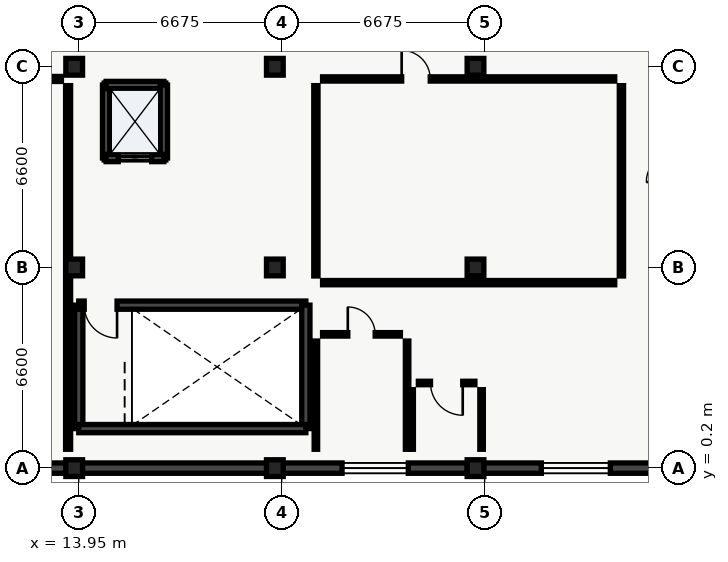
"""IFC4 building model, lengths in metres.
Left out: names, types, materials, properties, quantities, classifications, styles, units other than length and angle.
Written with IfcOpenShell. Run it as: python <this file> out.ifc"""

import sys

from ifc_helpers import new_model, si_unit, direction, frame, frame_2d, origin, origin_2d, place, context, subcontext, project, spatial, rectangle, extrude, element, fill, save


model = new_model("IFC4")
c1 = context("Model", 3, precision=1e-05, world=origin(), true_north=direction((0.0, 1.0)))
c2 = subcontext(c1, "Body", "Model", "MODEL_VIEW")
j1 = project(units=[si_unit("LENGTHUNIT", "METRE"), si_unit("PLANEANGLEUNIT", "RADIAN")], contexts=[c1])
p1 = place(None, origin())
s1 = spatial("IfcSite", under=j1, at=p1, CompositionType="ELEMENT")
p2 = place(p1, origin())
s2 = spatial("IfcBuilding", under=s1, at=p2, CompositionType="ELEMENT")
p3 = place(p2, frame((0.0, 0.0, 18.6)))
s3 = spatial("IfcBuildingStorey", under=s2, at=p3, CompositionType="ELEMENT", Elevation=18.6)
p4 = place(p3, frame((13.8, 0.2, 0.0), z_axis=(0.0, 0.0, 1.0), x_axis=(1.0, 0.0, 0.0)))
e1 = element("IfcColumn", 1, at=p4, inside=s3, PredefinedType="COLUMN", context=c2, shape_type="SweptSolid", body=[
    extrude(rectangle(XDim=0.55, YDim=0.55, at=origin_2d()), origin(), (0.0, 0.0, 1.0), 4.305),
])
p5 = place(p3, frame((13.8, 6.8, 0.0), z_axis=(0.0, 0.0, 1.0), x_axis=(1.0, 0.0, 0.0)))
e2 = element("IfcColumn", 2, at=p5, inside=s3, PredefinedType="COLUMN", context=c2, shape_type="SweptSolid", body=[
    extrude(rectangle(XDim=0.55, YDim=0.55, at=origin_2d()), origin(), (0.0, 0.0, 1.0), 5.905),
])
p6 = place(p3, frame((13.8, 13.4, 0.0), z_axis=(0.0, 0.0, 1.0), x_axis=(1.0, 0.0, 0.0)))
e3 = element("IfcColumn", 3, at=p6, inside=s3, PredefinedType="COLUMN", context=c2, shape_type="SweptSolid", body=[
    extrude(rectangle(XDim=0.55, YDim=0.55, at=origin_2d()), origin(), (0.0, 0.0, 1.0), 7.505),
])
p7 = place(p3, frame((20.4, 0.2, 0.0), z_axis=(0.0, 0.0, 1.0), x_axis=(1.0, 0.0, 0.0)))
e4 = element("IfcColumn", 4, at=p7, inside=s3, PredefinedType="COLUMN", context=c2, shape_type="SweptSolid", body=[
    extrude(rectangle(XDim=0.55, YDim=0.55, at=origin_2d()), origin(), (0.0, 0.0, 1.0), 4.305),
])
p8 = place(p3, frame((20.4, 6.8, 0.0), z_axis=(0.0, 0.0, 1.0), x_axis=(1.0, 0.0, 0.0)))
e5 = element("IfcColumn", 5, at=p8, inside=s3, PredefinedType="COLUMN", context=c2, shape_type="SweptSolid", body=[
    extrude(rectangle(XDim=0.55, YDim=0.55, at=origin_2d()), origin(), (0.0, 0.0, 1.0), 5.905),
])
p9 = place(p3, frame((20.4, 13.4, 0.0), z_axis=(0.0, 0.0, 1.0), x_axis=(1.0, 0.0, 0.0)))
e6 = element("IfcColumn", 6, at=p9, inside=s3, PredefinedType="COLUMN", context=c2, shape_type="SweptSolid", body=[
    extrude(rectangle(XDim=0.55, YDim=0.55, at=origin_2d()), origin(), (0.0, 0.0, 1.0), 7.505),
])
p10 = place(p3, frame((27.0, 0.2, 0.0), z_axis=(0.0, 0.0, 1.0), x_axis=(1.0, 0.0, 0.0)))
e7 = element("IfcColumn", 7, at=p10, inside=s3, PredefinedType="COLUMN", context=c2, shape_type="SweptSolid", body=[
    extrude(rectangle(XDim=0.55, YDim=0.55, at=origin_2d()), origin(), (0.0, 0.0, 1.0), 4.305),
])
p11 = place(p3, frame((27.0, 6.8, 0.0), z_axis=(0.0, 0.0, 1.0), x_axis=(1.0, 0.0, 0.0)))
e8 = element("IfcColumn", 8, at=p11, inside=s3, PredefinedType="COLUMN", context=c2, shape_type="SweptSolid", body=[
    extrude(rectangle(XDim=0.55, YDim=0.55, at=origin_2d()), origin(), (0.0, 0.0, 1.0), 5.905),
])
p12 = place(p3, frame((27.0, 13.4, 0.0), z_axis=(0.0, 0.0, 1.0), x_axis=(1.0, 0.0, 0.0)))
e9 = element("IfcColumn", 9, at=p12, inside=s3, PredefinedType="COLUMN", context=c2, shape_type="SweptSolid", body=[
    extrude(rectangle(XDim=0.55, YDim=0.55, at=origin_2d()), origin(), (0.0, 0.0, 1.0), 7.505),
])
p13 = place(p3, frame((33.33, 0.2, 0.0), z_axis=(0.0, 0.0, 1.0), x_axis=(-1.0, 0.0, 0.0)))
e10 = element("IfcWall", 10, at=p13, inside=s3, PredefinedType="SOLIDWALL", context=c2, shape_type="SweptSolid", body=[
    extrude(rectangle(XDim=6.06, YDim=0.34, at=frame_2d((3.03, 0.0))), origin(), (0.0, 0.0, 1.0), 4.28),
])
p14 = place(p13, frame((1.895, 0.0, 0.95)))
e11 = element("IfcOpeningElement", 11, at=p14, cuts=e10, PredefinedType="OPENING", context=c2, shape_type="SweptSolid", body=[
    extrude(rectangle(XDim=2.27, YDim=1.48, at=frame_2d((1.135, 0.74))), frame((0.0, 0.17, 0.0), z_axis=(0.0, -1.0, 0.0), x_axis=(1.0, 0.0, 0.0)), (0.0, 0.0, 1.0), 0.34),
])
p15 = place(p3, frame((26.73, 0.2, 0.0), z_axis=(0.0, 0.0, 1.0), x_axis=(-1.0, 0.0, 0.0)))
e12 = element("IfcWall", 12, at=p15, inside=s3, PredefinedType="SOLIDWALL", context=c2, shape_type="SweptSolid", body=[
    extrude(rectangle(XDim=6.06, YDim=0.34, at=frame_2d((3.03, 0.0))), origin(), (0.0, 0.0, 1.0), 4.28),
])
p16 = place(p15, frame((1.94, 0.0, 0.95)))
e13 = element("IfcOpeningElement", 13, at=p16, cuts=e12, PredefinedType="OPENING", context=c2, shape_type="SweptSolid", body=[
    extrude(rectangle(XDim=2.18, YDim=1.46, at=frame_2d((1.09, 0.73))), frame((0.0, 0.17, 0.0), z_axis=(0.0, -1.0, 0.0), x_axis=(1.0, 0.0, 0.0)), (0.0, 0.0, 1.0), 0.34),
])
p17 = place(p3, frame((20.13, 0.2, 0.0), z_axis=(0.0, 0.0, 1.0), x_axis=(-1.0, 0.0, 0.0)))
e14 = element("IfcWall", 14, at=p17, inside=s3, PredefinedType="SOLIDWALL", context=c2, shape_type="SweptSolid", body=[
    extrude(rectangle(XDim=6.06, YDim=0.34, at=frame_2d((3.03, 0.0))), origin(), (0.0, 0.0, 1.0), 4.28),
])
p18 = place(p3, frame((13.53, 0.2, 0.0), z_axis=(0.0, 0.0, 1.0), x_axis=(-1.0, 0.0, 0.0)))
e15 = element("IfcWall", 15, at=p18, inside=s3, PredefinedType="SOLIDWALL", context=c2, shape_type="SweptSolid", body=[
    extrude(rectangle(XDim=6.06, YDim=0.34, at=frame_2d((3.03, 0.0))), origin(), (0.0, 0.0, 1.0), 4.28),
])
p19 = place(p18, frame((2.03, 0.0, 0.95)))
e16 = element("IfcOpeningElement", 16, at=p19, cuts=e15, PredefinedType="OPENING", context=c2, shape_type="SweptSolid", body=[
    extrude(rectangle(XDim=2.0, YDim=1.42, at=frame_2d((1.0, 0.71))), frame((0.0, 0.17, 0.0), z_axis=(0.0, -1.0, 0.0), x_axis=(1.0, 0.0, 0.0)), (0.0, 0.0, 1.0), 0.34),
])
p20 = place(p3, frame((13.95, 1.5, 0.0), z_axis=(0.0, 0.0, 1.0), x_axis=(0.0, 1.0, 0.0)))
e17 = element("IfcWall", 17, at=p20, inside=s3, PredefinedType="SHEAR", context=c2, shape_type="SweptSolid", body=[
    extrude(rectangle(XDim=4.06, YDim=0.27, at=frame_2d((2.03, 0.0))), origin(), (0.0, 0.0, 1.0), 4.25),
])
p21 = place(p3, frame((13.95, 5.56, 0.0), z_axis=(0.0, 0.0, 1.0), x_axis=(1.0, 0.0, 0.0)))
e18 = element("IfcWall", 18, at=p21, inside=s3, PredefinedType="SHEAR", context=c2, shape_type="SweptSolid", body=[
    extrude(rectangle(XDim=7.47, YDim=0.27, at=frame_2d((3.735, 0.0))), origin(), (0.0, 0.0, 1.0), 4.25),
])
p22 = place(p21, frame((0.18, 0.0, 0.0)))
e19 = element("IfcOpeningElement", 19, at=p22, cuts=e18, PredefinedType="OPENING", context=c2, shape_type="SweptSolid", body=[
    extrude(rectangle(XDim=1.08, YDim=2.15, at=frame_2d((0.54, 1.075))), frame((0.0, 0.135, 0.0), z_axis=(0.0, -1.0, 0.0), x_axis=(1.0, 0.0, 0.0)), (0.0, 0.0, 1.0), 0.27),
])
p23 = place(p3, frame((21.42, 5.56, 0.0), z_axis=(0.0, 0.0, 1.0), x_axis=(0.0, -1.0, 0.0)))
e20 = element("IfcWall", 20, at=p23, inside=s3, PredefinedType="SHEAR", context=c2, shape_type="SweptSolid", body=[
    extrude(rectangle(XDim=4.06, YDim=0.27, at=frame_2d((2.03, 0.0))), origin(), (0.0, 0.0, 1.0), 4.25),
])
p24 = place(p3, frame((21.42, 1.5, 0.0), z_axis=(0.0, 0.0, 1.0), x_axis=(-1.0, 0.0, 0.0)))
e21 = element("IfcWall", 21, at=p24, inside=s3, PredefinedType="SHEAR", context=c2, shape_type="SweptSolid", body=[
    extrude(rectangle(XDim=7.47, YDim=0.27, at=frame_2d((3.735, 0.0))), origin(), (0.0, 0.0, 1.0), 4.25),
])
p25 = place(p3, frame((14.85, 10.4, 0.0), z_axis=(0.0, 0.0, 1.0), x_axis=(0.0, 1.0, 0.0)))
e22 = element("IfcWall", 22, at=p25, inside=s3, PredefinedType="SHEAR", context=c2, shape_type="SweptSolid", body=[
    extrude(rectangle(XDim=2.4, YDim=0.24, at=frame_2d((1.2, 0.0))), origin(), (0.0, 0.0, 1.0), 4.35),
])
p26 = place(p3, frame((14.85, 12.8, 0.0), z_axis=(0.0, 0.0, 1.0), x_axis=(1.0, 0.0, 0.0)))
e23 = element("IfcWall", 23, at=p26, inside=s3, PredefinedType="SHEAR", context=c2, shape_type="SweptSolid", body=[
    extrude(rectangle(XDim=1.9, YDim=0.24, at=frame_2d((0.95, 0.0))), origin(), (0.0, 0.0, 1.0), 4.35),
])
p27 = place(p3, frame((16.75, 12.8, 0.0), z_axis=(0.0, 0.0, 1.0), x_axis=(0.0, -1.0, 0.0)))
e24 = element("IfcWall", 24, at=p27, inside=s3, PredefinedType="SHEAR", context=c2, shape_type="SweptSolid", body=[
    extrude(rectangle(XDim=2.4, YDim=0.24, at=frame_2d((1.2, 0.0))), origin(), (0.0, 0.0, 1.0), 4.35),
])
p28 = place(p3, frame((16.75, 10.4, 0.0), z_axis=(0.0, 0.0, 1.0), x_axis=(-1.0, 0.0, 0.0)))
e25 = element("IfcWall", 25, at=p28, inside=s3, PredefinedType="SHEAR", context=c2, shape_type="SweptSolid", body=[
    extrude(rectangle(XDim=1.9, YDim=0.24, at=frame_2d((0.95, 0.0))), origin(), (0.0, 0.0, 1.0), 4.35),
])
p29 = place(p28, frame((0.4, 0.0, 0.0)))
e26 = element("IfcOpeningElement", 26, at=p29, cuts=e25, PredefinedType="OPENING", context=c2, shape_type="SweptSolid", body=[
    extrude(rectangle(XDim=1.1, YDim=2.2, at=frame_2d((0.55, 1.1))), frame((0.0, 0.12, 0.0), z_axis=(0.0, -1.0, 0.0), x_axis=(1.0, 0.0, 0.0)), (0.0, 0.0, 1.0), 0.24),
])
p30 = place(p3, frame((24.75, 0.82, 0.0), z_axis=(0.0, 0.0, 1.0), x_axis=(0.0, 1.0, 0.0)))
e27 = element("IfcWall", 27, at=p30, inside=s3, PredefinedType="PARTITIONING", context=c2, shape_type="SweptSolid", body=[
    extrude(rectangle(XDim=3.56, YDim=0.115, at=frame_2d((1.78, 0.0))), origin(), (0.0, 0.0, 1.0), 3.95),
])
p31 = place(p3, frame((24.53, 4.6, 0.0), z_axis=(0.0, 0.0, 1.0), x_axis=(-1.0, 0.0, 0.0)))
e28 = element("IfcWall", 28, at=p31, inside=s3, PredefinedType="PARTITIONING", context=c2, shape_type="SweptSolid", body=[
    extrude(rectangle(XDim=2.56, YDim=0.115, at=frame_2d((1.28, 0.0))), origin(), (0.0, 0.0, 1.0), 3.95),
])
p32 = place(p31, frame((0.83, 0.0, 0.0)))
e29 = element("IfcOpeningElement", 29, at=p32, cuts=e28, PredefinedType="OPENING", context=c2, shape_type="SweptSolid", body=[
    extrude(rectangle(XDim=0.9, YDim=2.1, at=frame_2d((0.45, 1.05))), frame((0.0, 0.058, 0.0), z_axis=(0.0, -1.0, 0.0), x_axis=(1.0, 0.0, 0.0)), (0.0, 0.0, 1.0), 0.115),
])
p33 = place(p3, frame((21.75, 4.38, 0.0), z_axis=(0.0, 0.0, 1.0), x_axis=(0.0, -1.0, 0.0)))
e30 = element("IfcWall", 30, at=p33, inside=s3, PredefinedType="PARTITIONING", context=c2, shape_type="SweptSolid", body=[
    extrude(rectangle(XDim=3.56, YDim=0.115, at=frame_2d((1.78, 0.0))), origin(), (0.0, 0.0, 1.0), 3.95),
])
p34 = place(p3, frame((27.2, 0.82, 0.0), z_axis=(0.0, 0.0, 1.0), x_axis=(0.0, 1.0, 0.0)))
e31 = element("IfcWall", 31, at=p34, inside=s3, PredefinedType="PARTITIONING", context=c2, shape_type="SweptSolid", body=[
    extrude(rectangle(XDim=1.96, YDim=0.115, at=frame_2d((0.98, 0.0))), origin(), (0.0, 0.0, 1.0), 3.69),
])
p35 = place(p3, frame((26.98, 3.0, 0.0), z_axis=(0.0, 0.0, 1.0), x_axis=(-1.0, 0.0, 0.0)))
e32 = element("IfcWall", 32, at=p35, inside=s3, PredefinedType="PARTITIONING", context=c2, shape_type="SweptSolid", body=[
    extrude(rectangle(XDim=1.86, YDim=0.115, at=frame_2d((0.93, 0.0))), origin(), (0.0, 0.0, 1.0), 3.95),
])
p36 = place(p35, frame((0.4, 0.0, 0.0)))
e33 = element("IfcOpeningElement", 33, at=p36, cuts=e32, PredefinedType="OPENING", context=c2, shape_type="SweptSolid", body=[
    extrude(rectangle(XDim=1.06, YDim=2.12, at=frame_2d((0.53, 1.06))), frame((0.0, 0.058, 0.0), z_axis=(0.0, -1.0, 0.0), x_axis=(1.0, 0.0, 0.0)), (0.0, 0.0, 1.0), 0.115),
])
p37 = place(p3, frame((24.9, 2.78, 0.0), z_axis=(0.0, 0.0, 1.0), x_axis=(0.0, -1.0, 0.0)))
e34 = element("IfcWall", 34, at=p37, inside=s3, PredefinedType="PARTITIONING", context=c2, shape_type="SweptSolid", body=[
    extrude(rectangle(XDim=1.96, YDim=0.115, at=frame_2d((0.98, 0.0))), origin(), (0.0, 0.0, 1.0), 3.95),
])
p38 = place(p3, frame((21.97, 6.3, 0.0), z_axis=(0.0, 0.0, 1.0), x_axis=(1.0, 0.0, 0.0)))
e35 = element("IfcWall", 35, at=p38, inside=s3, PredefinedType="PARTITIONING", context=c2, shape_type="SweptSolid", body=[
    extrude(rectangle(XDim=9.61, YDim=0.14, at=frame_2d((4.805, 0.0))), origin(), (0.0, 0.0, 1.0), 3.95),
])
p39 = place(p3, frame((31.8, 6.52, 0.0), z_axis=(0.0, 0.0, 1.0), x_axis=(0.0, 1.0, 0.0)))
e36 = element("IfcWall", 36, at=p39, inside=s3, PredefinedType="PARTITIONING", context=c2, shape_type="SweptSolid", body=[
    extrude(rectangle(XDim=6.26, YDim=0.14, at=frame_2d((3.13, 0.0))), origin(), (0.0, 0.0, 1.0), 3.95),
])
p40 = place(p3, frame((31.58, 13.0, 0.0), z_axis=(0.0, 0.0, 1.0), x_axis=(-1.0, 0.0, 0.0)))
e37 = element("IfcWall", 37, at=p40, inside=s3, PredefinedType="PARTITIONING", context=c2, shape_type="SweptSolid", body=[
    extrude(rectangle(XDim=9.61, YDim=0.14, at=frame_2d((4.805, 0.0))), origin(), (0.0, 0.0, 1.0), 3.95),
])
p41 = place(p40, frame((6.069, 0.0, 0.0)))
e38 = element("IfcOpeningElement", 38, at=p41, cuts=e37, PredefinedType="OPENING", context=c2, shape_type="SweptSolid", body=[
    extrude(rectangle(XDim=0.94, YDim=2.12, at=frame_2d((0.47, 1.06))), frame((0.0, 0.07, 0.0), z_axis=(0.0, -1.0, 0.0), x_axis=(1.0, 0.0, 0.0)), (0.0, 0.0, 1.0), 0.14),
])
p42 = place(p3, frame((21.75, 12.78, 0.0), z_axis=(0.0, 0.0, 1.0), x_axis=(0.0, -1.0, 0.0)))
e39 = element("IfcWall", 39, at=p42, inside=s3, PredefinedType="PARTITIONING", context=c2, shape_type="SweptSolid", body=[
    extrude(rectangle(XDim=6.26, YDim=0.14, at=frame_2d((3.13, 0.0))), origin(), (0.0, 0.0, 1.0), 3.95),
])
p43 = place(p3, frame((13.6, 0.82, 0.0), z_axis=(0.0, 0.0, 1.0), x_axis=(0.0, 1.0, 0.0)))
e40 = element("IfcWall", 40, at=p43, inside=s3, PredefinedType="PARTITIONING", context=c2, shape_type="SweptSolid", body=[
    extrude(rectangle(XDim=11.96, YDim=0.165, at=frame_2d((5.98, 0.0))), origin(), (0.0, 0.0, 1.0), 3.69),
])
p44 = place(p3, frame((13.38, 13.0, 0.0), z_axis=(0.0, 0.0, 1.0), x_axis=(-1.0, 0.0, 0.0)))
e41 = element("IfcWall", 41, at=p44, inside=s3, PredefinedType="PARTITIONING", context=c2, shape_type="SweptSolid", body=[
    extrude(rectangle(XDim=12.16, YDim=0.165, at=frame_2d((6.08, 0.0))), origin(), (0.0, 0.0, 1.0), 3.95),
])
p45 = place(p44, frame((7.665, 0.0, 0.0)))
e42 = element("IfcOpeningElement", 42, at=p45, cuts=e41, PredefinedType="OPENING", context=c2, shape_type="SweptSolid", body=[
    extrude(rectangle(XDim=1.21, YDim=2.16, at=frame_2d((0.605, 1.08))), frame((0.0, 0.083, 0.0), z_axis=(0.0, -1.0, 0.0), x_axis=(1.0, 0.0, 0.0)), (0.0, 0.0, 1.0), 0.165),
])
p46 = place(p14, origin())
e43 = element("IfcWindow", 43, at=p46, inside=s3, PartitioningType="SINGLE_PANEL", PredefinedType="WINDOW", context=c2, shape_type="SweptSolid", body=[
    extrude(rectangle(XDim=2.27, YDim=1.48, at=frame_2d((1.135, 0.74))), frame((0.0, 0.03, 0.0), z_axis=(0.0, -1.0, 0.0), x_axis=(1.0, 0.0, 0.0)), (0.0, 0.0, 1.0), 0.06),
])
fill(e11, e43)
p47 = place(p16, origin())
e44 = element("IfcWindow", 44, at=p47, inside=s3, PartitioningType="SINGLE_PANEL", PredefinedType="WINDOW", context=c2, shape_type="SweptSolid", body=[
    extrude(rectangle(XDim=2.18, YDim=1.46, at=frame_2d((1.09, 0.73))), frame((0.0, 0.03, 0.0), z_axis=(0.0, -1.0, 0.0), x_axis=(1.0, 0.0, 0.0)), (0.0, 0.0, 1.0), 0.06),
])
fill(e13, e44)
p48 = place(p22, origin())
e45 = element("IfcDoor", 45, at=p48, inside=s3, OperationType="SINGLE_SWING_RIGHT", PredefinedType="DOOR", context=c2, shape_type="SweptSolid", body=[
    extrude(rectangle(XDim=1.08, YDim=2.15, at=frame_2d((0.54, 1.075))), frame((0.0, 0.025, 0.0), z_axis=(0.0, -1.0, 0.0), x_axis=(1.0, 0.0, 0.0)), (0.0, 0.0, 1.0), 0.05),
])
fill(e19, e45)
p49 = place(p29, origin())
e46 = element("IfcDoor", 46, at=p49, inside=s3, OperationType="SLIDING_TO_LEFT", PredefinedType="DOOR", context=c2, shape_type="SweptSolid", body=[
    extrude(rectangle(XDim=1.1, YDim=2.2, at=frame_2d((0.55, 1.1))), frame((0.0, 0.025, 0.0), z_axis=(0.0, -1.0, 0.0), x_axis=(1.0, 0.0, 0.0)), (0.0, 0.0, 1.0), 0.05),
])
fill(e26, e46)
p50 = place(p32, origin())
e47 = element("IfcDoor", 47, at=p50, inside=s3, OperationType="SINGLE_SWING_RIGHT", PredefinedType="DOOR", context=c2, shape_type="SweptSolid", body=[
    extrude(rectangle(XDim=0.9, YDim=2.1, at=frame_2d((0.45, 1.05))), frame((0.0, 0.025, 0.0), z_axis=(0.0, -1.0, 0.0), x_axis=(1.0, 0.0, 0.0)), (0.0, 0.0, 1.0), 0.05),
])
fill(e29, e47)
p51 = place(p36, origin())
e48 = element("IfcDoor", 48, at=p51, inside=s3, OperationType="SINGLE_SWING_LEFT", PredefinedType="DOOR", context=c2, shape_type="SweptSolid", body=[
    extrude(rectangle(XDim=1.06, YDim=2.12, at=frame_2d((0.53, 1.06))), frame((0.0, 0.025, 0.0), z_axis=(0.0, -1.0, 0.0), x_axis=(1.0, 0.0, 0.0)), (0.0, 0.0, 1.0), 0.05),
])
fill(e33, e48)
p52 = place(p41, origin())
e49 = element("IfcDoor", 49, at=p52, inside=s3, OperationType="SINGLE_SWING_RIGHT", PredefinedType="DOOR", context=c2, shape_type="SweptSolid", body=[
    extrude(rectangle(XDim=0.94, YDim=2.12, at=frame_2d((0.47, 1.06))), frame((0.0, 0.025, 0.0), z_axis=(0.0, -1.0, 0.0), x_axis=(1.0, 0.0, 0.0)), (0.0, 0.0, 1.0), 0.05),
])
fill(e38, e49)
save(model, sys.argv[1])
